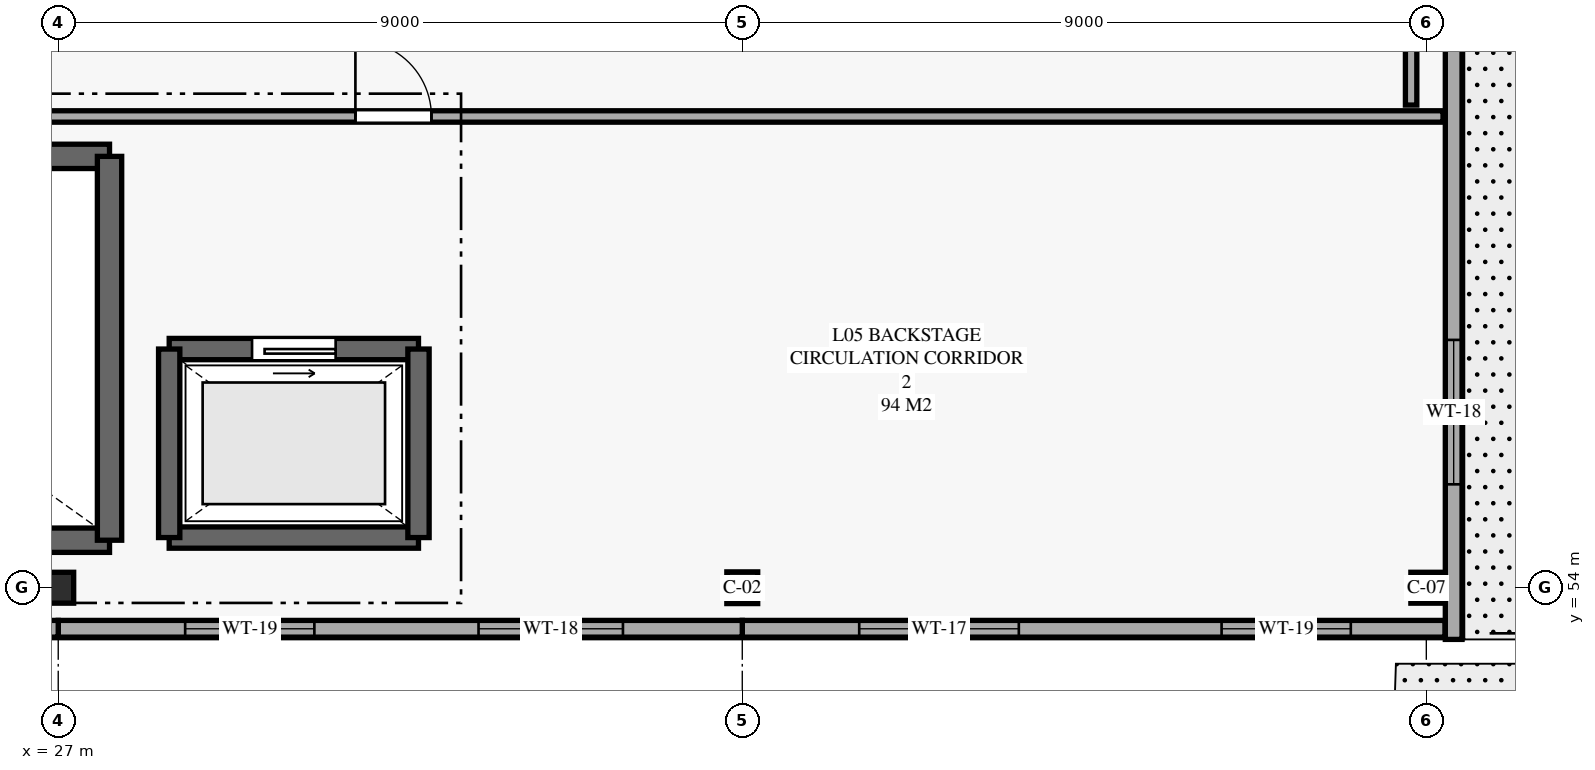
"""IFC4 building model, lengths in metres.
Left out: names, types, materials, properties, quantities, classifications, styles, units other than length and angle.
Written with IfcOpenShell. Run it as: python <this file> out.ifc"""

import sys

from ifc_helpers import new_model, si_unit, direction, frame, frame_2d, origin, origin_2d, place, context, subcontext, project, spatial, rectangle, hollow_rectangle, i_section, extrude, element, fill, save


model = new_model("IFC4")
c1 = context("Model", 3, precision=1e-05, world=origin(), true_north=direction((0.0, 1.0)))
c2 = subcontext(c1, "Body", "Model", "MODEL_VIEW")
j1 = project(units=[si_unit("LENGTHUNIT", "METRE"), si_unit("PLANEANGLEUNIT", "RADIAN")], contexts=[c1])
p1 = place(None, origin())
s1 = spatial("IfcSite", under=j1, at=p1, CompositionType="ELEMENT")
p2 = place(p1, origin())
s2 = spatial("IfcBuilding", under=s1, at=p2, CompositionType="ELEMENT")
p3 = place(p2, frame((0.0, 0.0, 24.8)))
s3 = spatial("IfcBuildingStorey", under=s2, at=p3, CompositionType="ELEMENT", Elevation=24.8)
p4 = place(p3, frame((27.0, 54.0, 0.0), z_axis=(0.0, 0.0, 1.0), x_axis=(1.0, 0.0, 0.0)))
e1 = element("IfcColumn", 1, at=p4, inside=s3, PredefinedType="COLUMN", context=c2, shape_type="SweptSolid", body=[
    extrude(hollow_rectangle(XDim=0.406, YDim=0.406, WallThickness=0.015, InnerFilletRadius=0.015, OuterFilletRadius=0.03, at=origin_2d()), origin(), (0.0, 0.0, 1.0), 4.53),
])
p5 = place(p3, frame((36.0, 54.0, 0.0), z_axis=(0.0, 0.0, 1.0), x_axis=(1.0, 0.0, 0.0)))
e2 = element("IfcColumn", 2, at=p5, inside=s3, PredefinedType="COLUMN", context=c2, shape_type="SweptSolid", body=[
    extrude(i_section(OverallWidth=0.406, OverallDepth=0.417, WebThickness=0.03, FlangeThickness=0.048, FilletRadius=0.018, at=origin_2d()), origin(), (0.0, 0.0, 1.0), 4.53),
])
p6 = place(p3, frame((45.0, 54.0, 0.0), z_axis=(0.0, 0.0, 1.0), x_axis=(1.0, 0.0, 0.0)))
e3 = element("IfcColumn", 3, at=p6, inside=s3, PredefinedType="COLUMN", context=c2, shape_type="SweptSolid", body=[
    extrude(hollow_rectangle(XDim=0.406, YDim=0.406, WallThickness=0.015, InnerFilletRadius=0.015, OuterFilletRadius=0.03, at=origin_2d()), origin(), (0.0, 0.0, 1.0), 4.53),
])
for number, where, z_axis, x_axis in (
    (4, (18.425, 54.625, 0.0), (0.0, 0.0, 1.0), (1.0, 0.0, 0.0)),
    (5, (27.675, 59.675, 0.0), (0.0, 0.0, 1.0), (-1.0, 0.0, 0.0)),
):
    element("IfcWall", number, at=place(p3, frame(where, z_axis=z_axis, x_axis=x_axis)), inside=s3, PredefinedType="SHEAR", context=c2, shape_type="SweptSolid", body=[
        extrude(rectangle(XDim=9.25, YDim=0.32, at=frame_2d((4.625, 0.0))), origin(), (0.0, 0.0, 1.0), 4.53),
    ])
p7 = place(p3, frame((27.675, 54.625, 0.0), z_axis=(0.0, 0.0, 1.0), x_axis=(0.0, 1.0, 0.0)))
e6 = element("IfcWall", 6, at=p7, inside=s3, PredefinedType="SHEAR", context=c2, shape_type="SweptSolid", body=[
    extrude(rectangle(XDim=5.05, YDim=0.32, at=frame_2d((2.525, 0.0))), origin(), (0.0, 0.0, 1.0), 4.53),
])
p8 = place(p3, frame((28.46, 54.66, 0.0), z_axis=(0.0, 0.0, 1.0), x_axis=(1.0, 0.0, 0.0)))
e7 = element("IfcWall", 7, at=p8, inside=s3, PredefinedType="SHEAR", context=c2, shape_type="SweptSolid", body=[
    extrude(rectangle(XDim=3.28, YDim=0.28, at=frame_2d((1.64, 0.0))), origin(), (0.0, 0.0, 1.0), 4.53),
])
p9 = place(p3, frame((31.74, 57.14, 0.0), z_axis=(0.0, 0.0, 1.0), x_axis=(-1.0, 0.0, 0.0)))
e8 = element("IfcWall", 8, at=p9, inside=s3, PredefinedType="SHEAR", context=c2, shape_type="SweptSolid", body=[
    extrude(rectangle(XDim=3.28, YDim=0.28, at=frame_2d((1.64, 0.0))), origin(), (0.0, 0.0, 1.0), 4.53),
])
p10 = place(p9, frame((1.09, 0.0, 0.0)))
e9 = element("IfcOpeningElement", 9, at=p10, cuts=e8, PredefinedType="OPENING", context=c2, shape_type="SweptSolid", body=[
    extrude(rectangle(XDim=1.1, YDim=2.2, at=frame_2d((0.55, 1.1))), frame((0.0, 0.15, 0.0), z_axis=(0.0, -1.0, 0.0), x_axis=(1.0, 0.0, 0.0)), (0.0, 0.0, 1.0), 0.3),
])
for number, where, z_axis, x_axis in (
    (10, (28.46, 57.14, 0.0), (0.0, 0.0, 1.0), (0.0, -1.0, 0.0)),
    (11, (31.74, 54.66, 0.0), (0.0, 0.0, 1.0), (0.0, 1.0, 0.0)),
):
    element("IfcWall", number, at=place(p3, frame(where, z_axis=z_axis, x_axis=x_axis)), inside=s3, PredefinedType="SHEAR", context=c2, shape_type="SweptSolid", body=[
        extrude(rectangle(XDim=2.48, YDim=0.28, at=frame_2d((1.24, 0.0))), origin(), (0.0, 0.0, 1.0), 4.53),
    ])
p11 = place(p3, frame((45.36, 64.0, 0.0), z_axis=(0.0, 0.0, 1.0), x_axis=(0.0, -1.0, 0.0)))
e12 = element("IfcWall", 12, at=p11, inside=s3, PredefinedType="SOLIDWALL", context=c2, shape_type="SweptSolid", body=[
    extrude(rectangle(XDim=10.68, YDim=0.22, at=frame_2d((5.34, 0.0))), origin(), (0.0, 0.0, 1.0), 4.53),
])
p12 = place(p11, frame((1.39, 0.0, 0.65)))
e13 = element("IfcOpeningElement", 13, at=p12, cuts=e12, PredefinedType="OPENING", context=c2, shape_type="SweptSolid", body=[
    extrude(rectangle(XDim=1.2, YDim=2.05, at=frame_2d((0.6, 1.025))), frame((0.0, 0.12, 0.0), z_axis=(0.0, -1.0, 0.0), x_axis=(1.0, 0.0, 0.0)), (0.0, 0.0, 1.0), 0.24),
])
p13 = place(p11, frame((6.74, 0.0, 0.8)))
e14 = element("IfcOpeningElement", 14, at=p13, cuts=e12, PredefinedType="OPENING", context=c2, shape_type="SweptSolid", body=[
    extrude(rectangle(XDim=1.9, YDim=1.8, at=frame_2d((0.95, 0.9))), frame((0.0, 0.12, 0.0), z_axis=(0.0, -1.0, 0.0), x_axis=(1.0, 0.0, 0.0)), (0.0, 0.0, 1.0), 0.24),
])
p14 = place(p3, frame((45.245, 53.46, 0.0), z_axis=(0.0, 0.0, 1.0), x_axis=(-1.0, 0.0, 0.0)))
e15 = element("IfcWall", 15, at=p14, inside=s3, PredefinedType="SOLIDWALL", context=c2, shape_type="SweptSolid", body=[
    extrude(rectangle(XDim=9.245, YDim=0.22, at=frame_2d((4.623, 0.0))), origin(), (0.0, 0.0, 1.0), 4.53),
])
p15 = place(p14, frame((1.239, 0.0, 0.8)))
e16 = element("IfcOpeningElement", 16, at=p15, cuts=e15, PredefinedType="OPENING", context=c2, shape_type="SweptSolid", body=[
    extrude(rectangle(XDim=1.7, YDim=1.8, at=frame_2d((0.85, 0.9))), frame((0.0, 0.12, 0.0), z_axis=(0.0, -1.0, 0.0), x_axis=(1.0, 0.0, 0.0)), (0.0, 0.0, 1.0), 0.24),
])
p16 = place(p14, frame((5.606, 0.0, 0.8)))
e17 = element("IfcOpeningElement", 17, at=p16, cuts=e15, PredefinedType="OPENING", context=c2, shape_type="SweptSolid", body=[
    extrude(rectangle(XDim=2.1, YDim=1.8, at=frame_2d((1.05, 0.9))), frame((0.0, 0.12, 0.0), z_axis=(0.0, -1.0, 0.0), x_axis=(1.0, 0.0, 0.0)), (0.0, 0.0, 1.0), 0.24),
])
p17 = place(p3, frame((36.0, 53.46, 0.0), z_axis=(0.0, 0.0, 1.0), x_axis=(-1.0, 0.0, 0.0)))
e18 = element("IfcWall", 18, at=p17, inside=s3, PredefinedType="SOLIDWALL", context=c2, shape_type="SweptSolid", body=[
    extrude(rectangle(XDim=9.0, YDim=0.22, at=frame_2d((4.5, 0.0))), origin(), (0.0, 0.0, 1.0), 4.53),
])
p18 = place(p17, frame((1.57, 0.0, 0.8)))
e19 = element("IfcOpeningElement", 19, at=p18, cuts=e18, PredefinedType="OPENING", context=c2, shape_type="SweptSolid", body=[
    extrude(rectangle(XDim=1.9, YDim=1.8, at=frame_2d((0.95, 0.9))), frame((0.0, 0.12, 0.0), z_axis=(0.0, -1.0, 0.0), x_axis=(1.0, 0.0, 0.0)), (0.0, 0.0, 1.0), 0.24),
])
p19 = place(p17, frame((5.63, 0.0, 0.8)))
e20 = element("IfcOpeningElement", 20, at=p19, cuts=e18, PredefinedType="OPENING", context=c2, shape_type="SweptSolid", body=[
    extrude(rectangle(XDim=1.7, YDim=1.8, at=frame_2d((0.85, 0.9))), frame((0.0, 0.12, 0.0), z_axis=(0.0, -1.0, 0.0), x_axis=(1.0, 0.0, 0.0)), (0.0, 0.0, 1.0), 0.24),
])
p20 = place(p3, frame((27.0, 53.46, 0.0), z_axis=(0.0, 0.0, 1.0), x_axis=(-1.0, 0.0, 0.0)))
e21 = element("IfcWall", 21, at=p20, inside=s3, PredefinedType="SOLIDWALL", context=c2, shape_type="SweptSolid", body=[
    extrude(rectangle(XDim=9.68, YDim=0.22, at=frame_2d((4.84, 0.0))), origin(), (0.0, 0.0, 1.0), 4.53),
])
p21 = place(p20, frame((1.96, 0.0, 0.8)))
e22 = element("IfcOpeningElement", 22, at=p21, cuts=e21, PredefinedType="OPENING", context=c2, shape_type="SweptSolid", body=[
    extrude(rectangle(XDim=1.5, YDim=1.8, at=frame_2d((0.75, 0.9))), frame((0.0, 0.12, 0.0), z_axis=(0.0, -1.0, 0.0), x_axis=(1.0, 0.0, 0.0)), (0.0, 0.0, 1.0), 0.24),
])
p22 = place(p20, frame((5.82, 0.0, 0.8)))
e23 = element("IfcOpeningElement", 23, at=p22, cuts=e21, PredefinedType="OPENING", context=c2, shape_type="SweptSolid", body=[
    extrude(rectangle(XDim=1.3, YDim=1.8, at=frame_2d((0.65, 0.9))), frame((0.0, 0.12, 0.0), z_axis=(0.0, -1.0, 0.0), x_axis=(1.0, 0.0, 0.0)), (0.0, 0.0, 1.0), 0.24),
])
p23 = place(p3, frame((17.6, 60.2, 0.0), z_axis=(0.0, 0.0, 1.0), x_axis=(1.0, 0.0, 0.0)))
e24 = element("IfcWall", 24, at=p23, inside=s3, PredefinedType="PARTITIONING", context=c2, shape_type="SweptSolid", body=[
    extrude(rectangle(XDim=27.62, YDim=0.15, at=frame_2d((13.81, 0.0))), origin(), (0.0, 0.0, 1.0), 4.53),
])
p24 = place(p23, frame((13.31, 0.0, 0.0)))
e25 = element("IfcOpeningElement", 25, at=p24, cuts=e24, PredefinedType="OPENING", context=c2, shape_type="SweptSolid", body=[
    extrude(rectangle(XDim=1.0, YDim=2.15, at=frame_2d((0.5, 1.075))), frame((0.0, 0.085, 0.0), z_axis=(0.0, -1.0, 0.0), x_axis=(1.0, 0.0, 0.0)), (0.0, 0.0, 1.0), 0.17),
])
p25 = place(p3, frame((44.8, 60.35, 0.0), z_axis=(0.0, 0.0, 1.0), x_axis=(0.0, 1.0, 0.0)))
e26 = element("IfcWall", 26, at=p25, inside=s3, PredefinedType="PARTITIONING", context=c2, shape_type="SweptSolid", body=[
    extrude(rectangle(XDim=3.496, YDim=0.15, at=frame_2d((1.748, 0.0))), origin(), (0.0, 0.0, 1.0), 4.053),
])
p26 = place(p13, origin())
e27 = element("IfcWindow", 27, at=p26, inside=s3, PartitioningType="SINGLE_PANEL", PredefinedType="WINDOW", context=c2, shape_type="SweptSolid", body=[
    extrude(rectangle(XDim=1.9, YDim=1.8, at=frame_2d((0.95, 0.9))), frame((0.0, 0.03, 0.0), z_axis=(0.0, -1.0, 0.0), x_axis=(1.0, 0.0, 0.0)), (0.0, 0.0, 1.0), 0.06),
])
fill(e14, e27)
p27 = place(p15, origin())
e28 = element("IfcWindow", 28, at=p27, inside=s3, PartitioningType="SINGLE_PANEL", PredefinedType="WINDOW", context=c2, shape_type="SweptSolid", body=[
    extrude(rectangle(XDim=1.7, YDim=1.8, at=frame_2d((0.85, 0.9))), frame((0.0, 0.03, 0.0), z_axis=(0.0, -1.0, 0.0), x_axis=(1.0, 0.0, 0.0)), (0.0, 0.0, 1.0), 0.06),
])
fill(e16, e28)
p28 = place(p16, origin())
e29 = element("IfcWindow", 29, at=p28, inside=s3, PartitioningType="SINGLE_PANEL", PredefinedType="WINDOW", context=c2, shape_type="SweptSolid", body=[
    extrude(rectangle(XDim=2.1, YDim=1.8, at=frame_2d((1.05, 0.9))), frame((0.0, 0.03, 0.0), z_axis=(0.0, -1.0, 0.0), x_axis=(1.0, 0.0, 0.0)), (0.0, 0.0, 1.0), 0.06),
])
fill(e17, e29)
p29 = place(p18, origin())
e30 = element("IfcWindow", 30, at=p29, inside=s3, PartitioningType="SINGLE_PANEL", PredefinedType="WINDOW", context=c2, shape_type="SweptSolid", body=[
    extrude(rectangle(XDim=1.9, YDim=1.8, at=frame_2d((0.95, 0.9))), frame((0.0, 0.03, 0.0), z_axis=(0.0, -1.0, 0.0), x_axis=(1.0, 0.0, 0.0)), (0.0, 0.0, 1.0), 0.06),
])
fill(e19, e30)
p30 = place(p19, origin())
e31 = element("IfcWindow", 31, at=p30, inside=s3, PartitioningType="SINGLE_PANEL", PredefinedType="WINDOW", context=c2, shape_type="SweptSolid", body=[
    extrude(rectangle(XDim=1.7, YDim=1.8, at=frame_2d((0.85, 0.9))), frame((0.0, 0.03, 0.0), z_axis=(0.0, -1.0, 0.0), x_axis=(1.0, 0.0, 0.0)), (0.0, 0.0, 1.0), 0.06),
])
fill(e20, e31)
p31 = place(p10, origin())
e32 = element("IfcDoor", 32, at=p31, inside=s3, OperationType="SLIDING_TO_LEFT", PredefinedType="DOOR", context=c2, shape_type="SweptSolid", body=[
    extrude(rectangle(XDim=1.1, YDim=2.2, at=frame_2d((0.55, 1.1))), frame((0.0, 0.025, 0.0), z_axis=(0.0, -1.0, 0.0), x_axis=(1.0, 0.0, 0.0)), (0.0, 0.0, 1.0), 0.05),
])
fill(e9, e32)
p32 = place(p24, origin())
e33 = element("IfcDoor", 33, at=p32, inside=s3, OperationType="SINGLE_SWING_LEFT", PredefinedType="DOOR", context=c2, shape_type="SweptSolid", body=[
    extrude(rectangle(XDim=1.0, YDim=2.15, at=frame_2d((0.5, 1.075))), frame((0.0, 0.025, 0.0), z_axis=(0.0, -1.0, 0.0), x_axis=(1.0, 0.0, 0.0)), (0.0, 0.0, 1.0), 0.05),
])
fill(e25, e33)
save(model, sys.argv[1])
